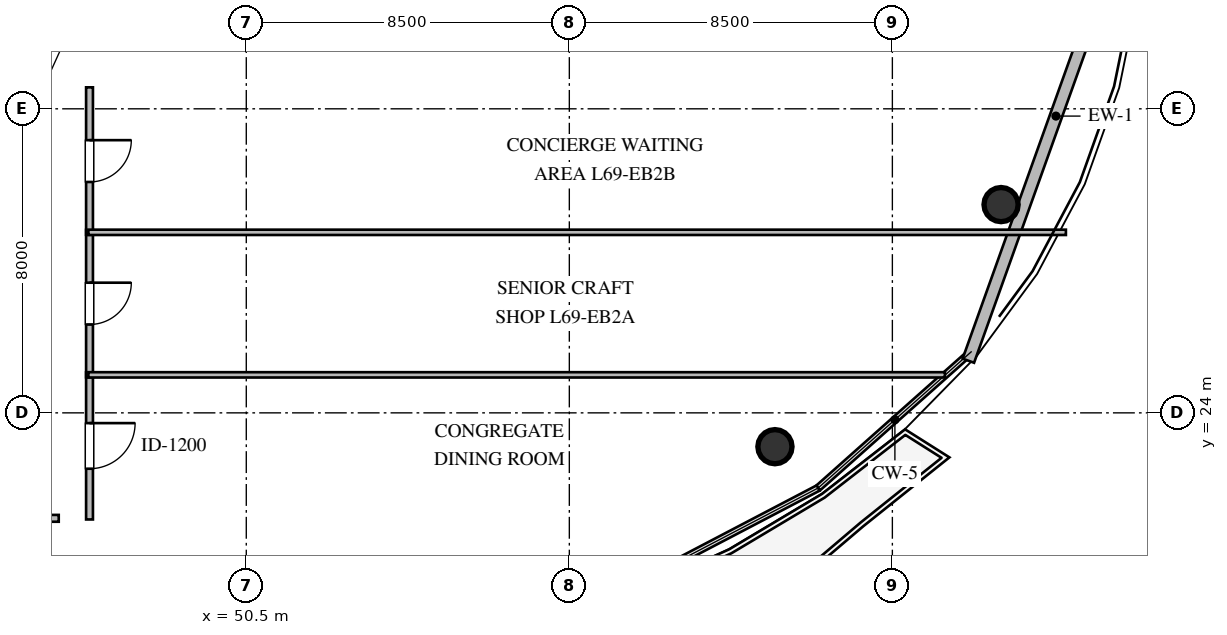
"""IFC4 building model, lengths in metres.
Left out: names, types, materials, properties, quantities, classifications, styles, units other than length and angle.
Written with IfcOpenShell. Run it as: python <this file> out.ifc"""

import sys

from ifc_helpers import new_model, si_unit, direction, frame, frame_2d, origin, origin_2d, place, context, subcontext, project, spatial, rectangle, circle, extrude, element, fill, save


model = new_model("IFC4")
c1 = context("Model", 3, precision=1e-05, world=origin(), true_north=direction((0.0, 1.0)))
c2 = subcontext(c1, "Body", "Model", "MODEL_VIEW")
j1 = project(units=[si_unit("LENGTHUNIT", "METRE"), si_unit("PLANEANGLEUNIT", "RADIAN")], contexts=[c1])
p1 = place(None, origin())
s1 = spatial("IfcSite", under=j1, at=p1, CompositionType="ELEMENT")
p2 = place(p1, origin())
s2 = spatial("IfcBuilding", under=s1, at=p2, CompositionType="ELEMENT")
p3 = place(p2, frame((0.0, 0.0, 262.4)))
s3 = spatial("IfcBuildingStorey", under=s2, at=p3, CompositionType="ELEMENT", Elevation=262.4)
for number, where, z_axis, x_axis in (
    (1, (64.41, 23.11, 0.0), (0.0, 0.0, 1.0), (1.0, 0.0, 0.0)),
    (2, (70.36, 29.48, 0.0), (0.0, 0.0, 1.0), (1.0, 0.0, 0.0)),
):
    element("IfcColumn", number, at=place(p3, frame(where, z_axis=z_axis, x_axis=x_axis)), inside=s3, PredefinedType="COLUMN", context=c2, shape_type="SweptSolid", body=[
        extrude(circle(Radius=0.45, at=origin_2d()), origin(), (0.0, 0.0, 1.0), 3.8),
    ])
p4 = place(p3, frame((74.108, 38.245, 0.0), z_axis=(0.0, 0.0, 1.0), x_axis=(-0.337073777429, -0.941478235845, 0.0)))
e3 = element("IfcWall", 3, at=p4, inside=s3, PredefinedType="STANDARD", context=c2, shape_type="SweptSolid", body=[
    extrude(rectangle(XDim=13.673, YDim=0.32, at=frame_2d((6.837, 0.0))), origin(), (0.0, 0.0, 1.0), 3.56),
])
p5 = place(p3, frame((46.375, 25.065, 0.0), z_axis=(0.0, 0.0, 1.0), x_axis=(0.0, -1.0, 0.0)))
e4 = element("IfcWall", 4, at=p5, inside=s3, PredefinedType="PARTITIONING", context=c2, shape_type="SweptSolid", body=[
    extrude(rectangle(XDim=3.87, YDim=0.18, at=frame_2d((1.935, 0.0))), origin(), (0.0, 0.0, 1.0), 3.56),
])
p6 = place(p5, frame((1.335, 0.0, 0.0)))
e5 = element("IfcOpeningElement", 5, at=p6, cuts=e4, PredefinedType="OPENING", context=c2, shape_type="SweptSolid", body=[
    extrude(rectangle(XDim=1.2, YDim=2.15, at=frame_2d((0.6, 1.075))), frame((0.0, 0.1, 0.0), z_axis=(0.0, -1.0, 0.0), x_axis=(1.0, 0.0, 0.0)), (0.0, 0.0, 1.0), 0.2),
])
p7 = place(p3, frame((46.375, 28.815, 0.0), z_axis=(0.0, 0.0, 1.0), x_axis=(0.0, -1.0, 0.0)))
e6 = element("IfcWall", 6, at=p7, inside=s3, PredefinedType="PARTITIONING", context=c2, shape_type="SweptSolid", body=[
    extrude(rectangle(XDim=3.88, YDim=0.18, at=frame_2d((1.94, 0.0))), origin(), (0.0, 0.0, 1.0), 3.56),
])
p8 = place(p7, frame((1.39, 0.0, 0.0)))
e7 = element("IfcOpeningElement", 7, at=p8, cuts=e6, PredefinedType="OPENING", context=c2, shape_type="SweptSolid", body=[
    extrude(rectangle(XDim=1.1, YDim=2.1, at=frame_2d((0.55, 1.05))), frame((0.0, 0.1, 0.0), z_axis=(0.0, -1.0, 0.0), x_axis=(1.0, 0.0, 0.0)), (0.0, 0.0, 1.0), 0.2),
])
p9 = place(p3, frame((46.375, 32.565, 0.0), z_axis=(0.0, 0.0, 1.0), x_axis=(0.0, -1.0, 0.0)))
e8 = element("IfcWall", 8, at=p9, inside=s3, PredefinedType="PARTITIONING", context=c2, shape_type="SweptSolid", body=[
    extrude(rectangle(XDim=3.88, YDim=0.18, at=frame_2d((1.94, 0.0))), origin(), (0.0, 0.0, 1.0), 3.56),
])
p10 = place(p9, frame((1.39, 0.0, 0.0)))
e9 = element("IfcOpeningElement", 9, at=p10, cuts=e8, PredefinedType="OPENING", context=c2, shape_type="SweptSolid", body=[
    extrude(rectangle(XDim=1.1, YDim=2.1, at=frame_2d((0.55, 1.05))), frame((0.0, 0.1, 0.0), z_axis=(0.0, -1.0, 0.0), x_axis=(1.0, 0.0, 0.0)), (0.0, 0.0, 1.0), 0.2),
])
p11 = place(p3, frame((45.565, 21.225, 0.0), z_axis=(0.0, 0.0, 1.0), x_axis=(-1.0, 0.0, 0.0)))
e10 = element("IfcWall", 10, at=p11, inside=s3, PredefinedType="PARTITIONING", context=c2, shape_type="SweptSolid", body=[
    extrude(rectangle(XDim=14.13, YDim=0.18, at=frame_2d((7.065, 0.0))), origin(), (0.0, 0.0, 1.0), 3.196),
])
p12 = place(p11, frame((6.515, 0.0, 0.0)))
e11 = element("IfcOpeningElement", 11, at=p12, cuts=e10, PredefinedType="OPENING", context=c2, shape_type="SweptSolid", body=[
    extrude(rectangle(XDim=1.1, YDim=2.1, at=frame_2d((0.55, 1.05))), frame((0.0, 0.1, 0.0), z_axis=(0.0, -1.0, 0.0), x_axis=(1.0, 0.0, 0.0)), (0.0, 0.0, 1.0), 0.2),
])
p13 = place(p3, frame((46.345, 25.0, 0.0), z_axis=(0.0, 0.0, 1.0), x_axis=(1.0, 0.0, 0.0)))
e12 = element("IfcWall", 12, at=p13, inside=s3, PredefinedType="PARTITIONING", context=c2, shape_type="SweptSolid", body=[
    extrude(rectangle(XDim=22.539, YDim=0.14, at=frame_2d((11.269, 0.0))), origin(), (0.0, 0.0, 1.0), 3.56),
])
p14 = place(p3, frame((46.345, 28.75, 0.0), z_axis=(0.0, 0.0, 1.0), x_axis=(1.0, 0.0, 0.0)))
e13 = element("IfcWall", 13, at=p14, inside=s3, PredefinedType="PARTITIONING", context=c2, shape_type="SweptSolid", body=[
    extrude(rectangle(XDim=25.721, YDim=0.14, at=frame_2d((12.86, 0.0))), origin(), (0.0, 0.0, 1.0), 3.56),
])
p15 = place(p6, origin())
e14 = element("IfcDoor", 14, at=p15, inside=s3, OperationType="SINGLE_SWING_LEFT", PredefinedType="DOOR", context=c2, shape_type="SweptSolid", body=[
    extrude(rectangle(XDim=1.2, YDim=2.15, at=frame_2d((0.6, 1.075))), frame((0.0, 0.025, 0.0), z_axis=(0.0, -1.0, 0.0), x_axis=(1.0, 0.0, 0.0)), (0.0, 0.0, 1.0), 0.05),
])
fill(e5, e14)
p16 = place(p8, origin())
e15 = element("IfcDoor", 15, at=p16, inside=s3, OperationType="SINGLE_SWING_LEFT", PredefinedType="DOOR", context=c2, shape_type="SweptSolid", body=[
    extrude(rectangle(XDim=1.1, YDim=2.1, at=frame_2d((0.55, 1.05))), frame((0.0, 0.025, 0.0), z_axis=(0.0, -1.0, 0.0), x_axis=(1.0, 0.0, 0.0)), (0.0, 0.0, 1.0), 0.05),
])
fill(e7, e15)
p17 = place(p10, origin())
e16 = element("IfcDoor", 16, at=p17, inside=s3, OperationType="SINGLE_SWING_LEFT", PredefinedType="DOOR", context=c2, shape_type="SweptSolid", body=[
    extrude(rectangle(XDim=1.1, YDim=2.1, at=frame_2d((0.55, 1.05))), frame((0.0, 0.025, 0.0), z_axis=(0.0, -1.0, 0.0), x_axis=(1.0, 0.0, 0.0)), (0.0, 0.0, 1.0), 0.05),
])
fill(e9, e16)
save(model, sys.argv[1])
